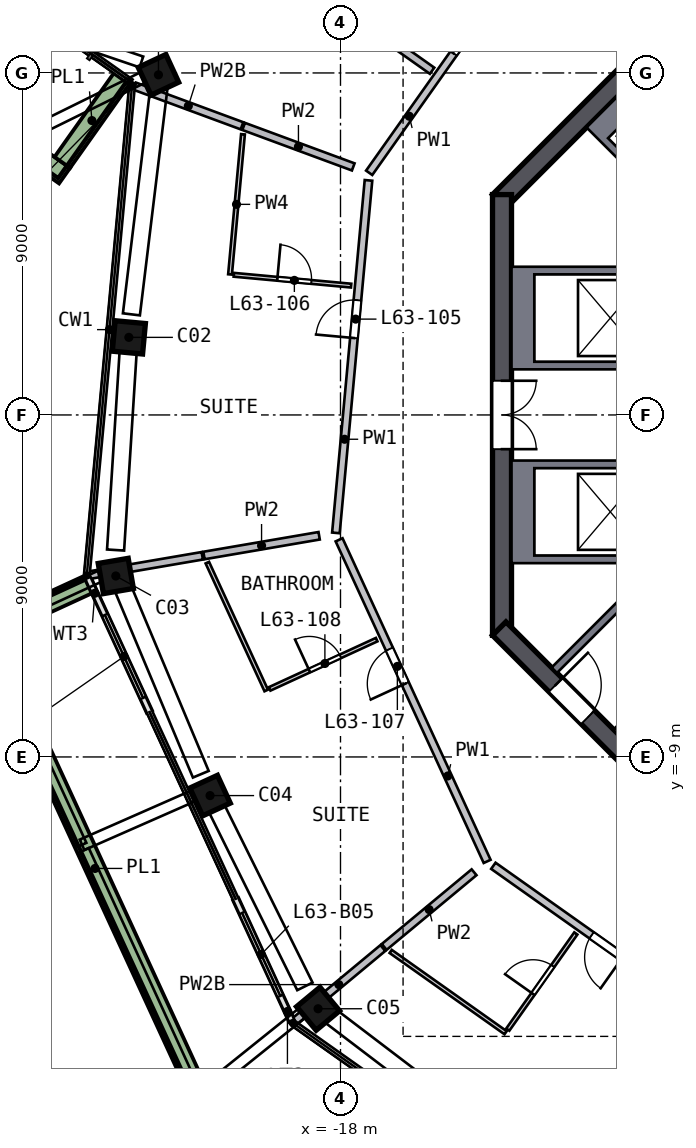
"""IFC4 building model, lengths in metres.
Left out: names, types, materials, properties, quantities, classifications, styles, units other than length and angle.
Written with IfcOpenShell. Run it as: python <this file> out.ifc"""

import sys

from ifc_helpers import new_model, si_unit, direction, frame, frame_2d, origin, origin_2d, place, context, subcontext, project, spatial, polyline, rectangle, outline, extrude, element, fill, save


model = new_model("IFC4")
c1 = context("Model", 3, precision=1e-05, world=origin(), true_north=direction((0.0, 1.0)))
c2 = subcontext(c1, "Body", "Model", "MODEL_VIEW")
j1 = project(units=[si_unit("LENGTHUNIT", "METRE"), si_unit("PLANEANGLEUNIT", "RADIAN")], contexts=[c1])
p1 = place(None, origin())
s1 = spatial("IfcSite", under=j1, at=p1, CompositionType="ELEMENT")
p2 = place(p1, origin())
s2 = spatial("IfcBuilding", under=s1, at=p2, CompositionType="ELEMENT")
p3 = place(p2, frame((0.0, 0.0, 256.0)))
s3 = spatial("IfcBuildingStorey", under=s2, at=p3, CompositionType="ELEMENT", Elevation=256.0)
p4 = place(p3, frame((-22.739, 9.081, 0.0), z_axis=(-0.042339736, -0.108471819, 0.993197468), x_axis=(-0.42248702, 0.902779355, 0.080586321)))
e1 = element("IfcColumn", 1, at=p4, inside=s3, PredefinedType="COLUMN", context=c2, shape_type="SweptSolid", body=[
    extrude(rectangle(XDim=0.8, YDim=0.8, at=origin_2d()), origin(), (0.0, 0.0, 1.0), 3.212),
])
p5 = place(p3, frame((-23.558, 2.177, 0.0), z_axis=(-0.009430042, -0.112095822, 0.993652656), x_axis=(-0.091695583, -0.98941317, -0.112487775)))
e2 = element("IfcColumn", 2, at=p5, inside=s3, PredefinedType="COLUMN", context=c2, shape_type="SweptSolid", body=[
    extrude(rectangle(XDim=0.8, YDim=0.8, at=origin_2d()), origin(), (0.0, 0.0, 1.0), 3.21),
])
p6 = place(p3, frame((-23.937, -4.1, 0.0), z_axis=(0.020450052, -0.113653633, 0.993309945), x_axis=(-0.167598199, 0.97906917, 0.115474692)))
e3 = element("IfcColumn", 3, at=p6, inside=s3, PredefinedType="COLUMN", context=c2, shape_type="SweptSolid", body=[
    extrude(rectangle(XDim=0.8, YDim=0.8, at=origin_2d()), origin(), (0.0, 0.0, 1.0), 3.211),
])
p7 = place(p3, frame((-21.49, -9.894, 0.0), z_axis=(0.047910452, -0.101828723, 0.993647573), x_axis=(0.415383165, -0.902658976, -0.112532662)))
e4 = element("IfcColumn", 4, at=p7, inside=s3, PredefinedType="COLUMN", context=c2, shape_type="SweptSolid", body=[
    extrude(rectangle(XDim=0.8, YDim=0.8, at=origin_2d()), origin(), (0.0, 0.0, 1.0), 3.21),
])
p8 = place(p3, frame((-18.68, -15.52, 0.0), z_axis=(0.074577946, -0.08818595, 0.993308295), x_axis=(-0.634952421, 0.763870238, 0.115488887)))
e5 = element("IfcColumn", 5, at=p8, inside=s3, PredefinedType="COLUMN", context=c2, shape_type="SweptSolid", body=[
    extrude(rectangle(XDim=0.8, YDim=0.8, at=origin_2d()), origin(), (0.0, 0.0, 1.0), 3.211),
])
p9 = place(p3, frame((-5.622, 13.823, 0.0), z_axis=(0.0, 0.0, 1.0), x_axis=(-0.707106781, -0.707106781, 0.0)))
e6 = element("IfcWall", 6, at=p9, inside=s3, PredefinedType="SHEAR", context=c2, shape_type="SweptSolid", body=[
    extrude(rectangle(XDim=11.598, YDim=0.5, at=frame_2d((5.799, 0.0))), origin(), (0.0, 0.0, 1.0), 3.5),
])
p10 = place(p3, frame((-13.75, 5.799, 0.0), z_axis=(0.0, 0.0, 1.0), x_axis=(0.0, -1.0, 0.0)))
e7 = element("IfcWall", 7, at=p10, inside=s3, PredefinedType="SHEAR", context=c2, shape_type="SweptSolid", body=[
    extrude(rectangle(XDim=11.598, YDim=0.5, at=frame_2d((5.799, 0.0))), origin(), (0.0, 0.0, 1.0), 3.5),
])
p11 = place(p10, frame((4.899, 0.0, 0.0)))
e8 = element("IfcOpeningElement", 8, at=p11, cuts=e7, PredefinedType="OPENING", context=c2, shape_type="SweptSolid", body=[
    extrude(rectangle(XDim=1.8, YDim=2.1, at=frame_2d((0.9, 1.05))), frame((0.0, 0.26, 0.0), z_axis=(0.0, -1.0, 0.0), x_axis=(1.0, 0.0, 0.0)), (0.0, 0.0, 1.0), 0.52),
])
p12 = place(p3, frame((-13.823, -5.622, 0.0), z_axis=(0.0, 0.0, 1.0), x_axis=(0.707106781, -0.707106781, 0.0)))
e9 = element("IfcWall", 9, at=p12, inside=s3, PredefinedType="SHEAR", context=c2, shape_type="SweptSolid", body=[
    extrude(rectangle(XDim=11.598, YDim=0.5, at=frame_2d((5.799, 0.0))), origin(), (0.0, 0.0, 1.0), 3.5),
])
p13 = place(p12, frame((2.099, 0.0, 0.0)))
e10 = element("IfcOpeningElement", 10, at=p13, cuts=e9, PredefinedType="OPENING", context=c2, shape_type="SweptSolid", body=[
    extrude(rectangle(XDim=1.2, YDim=2.1, at=frame_2d((0.6, 1.05))), frame((0.0, 0.26, 0.0), z_axis=(0.0, -1.0, 0.0), x_axis=(1.0, 0.0, 0.0)), (0.0, 0.0, 1.0), 0.52),
])
p14 = place(p3, frame((-24.644, -4.3, 0.0), z_axis=(0.0, 0.0, 1.0), x_axis=(0.418188304, -0.908360359, 0.0)))
e11 = element("IfcWall", 11, at=p14, inside=s3, PredefinedType="SOLIDWALL", context=c2, shape_type="SweptSolid", body=[
    extrude(rectangle(XDim=3.863, YDim=0.15, at=frame_2d((1.932, 0.0))), origin(), (0.0, 0.0, 1.0), 2.525),
])
p15 = place(p14, frame((1.063, 0.0, 0.0)))
e12 = element("IfcOpeningElement", 12, at=p15, cuts=e11, PredefinedType="OPENING", context=c2, shape_type="SweptSolid", body=[
    extrude(rectangle(XDim=2.4, YDim=2.4, at=frame_2d((1.2, 1.2))), frame((0.0, 0.085, 0.0), z_axis=(0.0, -1.0, 0.0), x_axis=(1.0, 0.0, 0.0)), (0.0, 0.0, 1.0), 0.17),
])
p16 = place(p3, frame((-20.756, -12.743, 0.0), z_axis=(0.0, 0.0, 1.0), x_axis=(0.418165506, -0.908370855, 0.0)))
e13 = element("IfcWall", 13, at=p16, inside=s3, PredefinedType="SOLIDWALL", context=c2, shape_type="SweptSolid", body=[
    extrude(rectangle(XDim=3.504, YDim=0.15, at=frame_2d((1.752, 0.0))), origin(), (0.0, 0.0, 1.0), 2.525),
])
p17 = place(p16, frame((0.4, 0.0, 0.0)))
e14 = element("IfcOpeningElement", 14, at=p17, cuts=e13, PredefinedType="OPENING", context=c2, shape_type="SweptSolid", body=[
    extrude(rectangle(XDim=2.4, YDim=2.4, at=frame_2d((1.2, 1.2))), frame((0.0, 0.085, 0.0), z_axis=(0.0, -1.0, 0.0), x_axis=(1.0, 0.0, 0.0)), (0.0, 0.0, 1.0), 0.17),
])
p18 = place(p3, frame((-29.748, 9.471, 0.0), z_axis=(0.0, 0.0, 1.0), x_axis=(0.816360468, -0.577542714, 0.0)))
e15 = element("IfcWall", 15, at=p18, inside=s3, PredefinedType="SOLIDWALL", context=c2, shape_type="SweptSolid", body=[
    extrude(rectangle(XDim=5.496, YDim=0.5, at=frame_2d((2.748, 0.0))), origin(), (0.0, 0.0, 1.0), 0.7),
])
p19 = place(p3, frame((-25.321, 6.645, 0.0), z_axis=(0.0, 0.0, 1.0), x_axis=(0.577552948, 0.816353227, 0.0)))
e16 = element("IfcWall", 16, at=p19, inside=s3, PredefinedType="SOLIDWALL", context=c2, shape_type="SweptSolid", body=[
    extrude(rectangle(XDim=2.699, YDim=0.5, at=frame_2d((1.35, 0.0))), origin(), (0.0, 0.0, 1.0), 0.7),
])
p20 = place(p3, frame((-24.65, -4.468, 0.0), z_axis=(0.0, 0.0, 1.0), x_axis=(-0.908343202, -0.418225571, 0.0)))
e17 = element("IfcWall", 17, at=p20, inside=s3, PredefinedType="SOLIDWALL", context=c2, shape_type="SweptSolid", body=[
    extrude(rectangle(XDim=3.199, YDim=0.5, at=frame_2d((1.6, 0.0))), origin(), (0.0, 0.0, 1.0), 0.7),
])
p21 = place(p3, frame((-27.224, -5.928, 0.0), z_axis=(0.0, 0.0, 1.0), x_axis=(0.418179878, -0.908364238, 0.0)))
e18 = element("IfcWall", 18, at=p21, inside=s3, PredefinedType="SOLIDWALL", context=c2, shape_type="SweptSolid", body=[
    extrude(rectangle(XDim=13.223, YDim=0.5, at=frame_2d((6.612, 0.0))), origin(), (0.0, 0.0, 1.0), 0.7),
])
p22 = place(p3, origin())
e19 = element("IfcWall", 19, at=p22, inside=s3, PredefinedType="SOLIDWALL", context=c2, shape_type="SweptSolid", body=[
    extrude(outline(polyline([(-13.5, 3.9), (-9.9, 3.9), (-9.9, 3.7), (-12.9, 3.7), (-12.9, 1.4), (-9.9, 1.4), (-9.9, 1.2), (-13.5, 1.2), (-13.5, 3.9)])), origin(), (0.0, 0.0, 1.0), 3.19),
])
p23 = place(p3, origin())
e20 = element("IfcWall", 20, at=p23, inside=s3, PredefinedType="SOLIDWALL", context=c2, shape_type="SweptSolid", body=[
    extrude(outline(polyline([(-13.5, -3.9), (-13.5, -1.2), (-9.9, -1.2), (-9.9, -1.4), (-12.9, -1.4), (-12.9, -3.7), (-9.9, -3.7), (-9.9, -3.9), (-13.5, -3.9)])), origin(), (0.0, 0.0, 1.0), 3.19),
])
p24 = place(p3, origin())
e21 = element("IfcWall", 21, at=p24, inside=s3, PredefinedType="SOLIDWALL", context=c2, shape_type="SweptSolid", body=[
    extrude(outline(polyline([(-11.526, 7.566), (-9.617, 9.475), (-9.192, 9.051), (-10.96, 7.283), (-8.874, 5.197), (-9.016, 5.056), (-11.526, 7.566)])), origin(), (0.0, 0.0, 1.0), 3.19),
])
p25 = place(p3, frame((-9.334, -3.677, 0.0), z_axis=(0.0, 0.0, 1.0), x_axis=(-0.707135168, -0.707078393, 0.0)))
e22 = element("IfcWall", 22, at=p25, inside=s3, PredefinedType="SOLIDWALL", context=c2, shape_type="SweptSolid", body=[
    extrude(rectangle(XDim=4.3, YDim=0.2, at=frame_2d((2.15, 0.0))), origin(), (0.0, 0.0, 1.0), 3.19),
])
p26 = place(p3, frame((-18.121, -3.104, 0.0), z_axis=(0.0, 0.0, 1.0), x_axis=(0.092031251, 0.995756119, 0.0)))
e23 = element("IfcWall", 23, at=p26, inside=s3, PredefinedType="SOLIDWALL", context=c2, shape_type="SweptSolid", body=[
    extrude(rectangle(XDim=9.317, YDim=0.2, at=frame_2d((4.658, 0.0))), origin(), (0.0, 0.0, 1.0), 3.19),
])
p27 = place(p26, frame((5.15, 0.0, 0.0)))
e24 = element("IfcOpeningElement", 24, at=p27, cuts=e23, PredefinedType="OPENING", context=c2, shape_type="SweptSolid", body=[
    extrude(rectangle(XDim=1.0, YDim=2.1, at=frame_2d((0.5, 1.05))), frame((0.0, 0.11, 0.0), z_axis=(0.0, -1.0, 0.0), x_axis=(1.0, 0.0, 0.0)), (0.0, 0.0, 1.0), 0.22),
])
p28 = place(p3, frame((-14.141, -11.749, 0.0), z_axis=(0.0, 0.0, 1.0), x_axis=(-0.418177241, 0.908365452, 0.0)))
e25 = element("IfcWall", 25, at=p28, inside=s3, PredefinedType="SOLIDWALL", context=c2, shape_type="SweptSolid", body=[
    extrude(rectangle(XDim=9.317, YDim=0.2, at=frame_2d((4.658, 0.0))), origin(), (0.0, 0.0, 1.0), 3.19),
])
p29 = place(p28, frame((5.15, 0.0, 0.0)))
e26 = element("IfcOpeningElement", 26, at=p29, cuts=e25, PredefinedType="OPENING", context=c2, shape_type="SweptSolid", body=[
    extrude(rectangle(XDim=1.0, YDim=2.1, at=frame_2d((0.5, 1.05))), frame((0.0, 0.11, 0.0), z_axis=(0.0, -1.0, 0.0), x_axis=(1.0, 0.0, 0.0)), (0.0, 0.0, 1.0), 0.22),
])
p30 = place(p3, frame((-17.245, 6.372, 0.0), z_axis=(0.0, 0.0, 1.0), x_axis=(0.577581016, 0.81633337, 0.0)))
e27 = element("IfcWall", 27, at=p30, inside=s3, PredefinedType="SOLIDWALL", context=c2, shape_type="SweptSolid", body=[
    extrude(rectangle(XDim=9.317, YDim=0.2, at=frame_2d((4.658, 0.0))), origin(), (0.0, 0.0, 1.0), 3.19),
])
p31 = place(p30, frame((3.848, 0.0, 0.0)))
e28 = element("IfcOpeningElement", 28, at=p31, cuts=e27, PredefinedType="OPENING", context=c2, shape_type="SweptSolid", body=[
    extrude(rectangle(XDim=1.8, YDim=2.1, at=frame_2d((0.9, 1.05))), frame((0.0, 0.11, 0.0), z_axis=(0.0, -1.0, 0.0), x_axis=(1.0, 0.0, 0.0)), (0.0, 0.0, 1.0), 0.22),
])
p32 = place(p3, frame((-6.372, -17.245, 0.0), z_axis=(0.0, 0.0, 1.0), x_axis=(-0.81633337, 0.577581016, 0.0)))
e29 = element("IfcWall", 29, at=p32, inside=s3, PredefinedType="SOLIDWALL", context=c2, shape_type="SweptSolid", body=[
    extrude(rectangle(XDim=9.317, YDim=0.2, at=frame_2d((4.658, 0.0))), origin(), (0.0, 0.0, 1.0), 3.19),
])
p33 = place(p32, frame((5.15, 0.0, 0.0)))
e30 = element("IfcOpeningElement", 30, at=p33, cuts=e29, PredefinedType="OPENING", context=c2, shape_type="SweptSolid", body=[
    extrude(rectangle(XDim=1.0, YDim=2.1, at=frame_2d((0.5, 1.05))), frame((0.0, 0.11, 0.0), z_axis=(0.0, -1.0, 0.0), x_axis=(1.0, 0.0, 0.0)), (0.0, 0.0, 1.0), 0.22),
])
p34 = place(p3, frame((-21.637, -3.706, 0.0), z_axis=(0.0, 0.0, 1.0), x_axis=(-0.985638837, -0.168867058, 0.0)))
e31 = element("IfcWall", 31, at=p34, inside=s3, PredefinedType="SOLIDWALL", context=c2, shape_type="SweptSolid", body=[
    extrude(rectangle(XDim=3.011, YDim=0.2, at=frame_2d((1.506, 0.0))), origin(), (0.0, 0.0, 1.0), 3.19),
])
p35 = place(p3, frame((-20.592, 7.609, 0.0), z_axis=(0.0, 0.0, 1.0), x_axis=(-0.93799106, 0.346659445, 0.0)))
e32 = element("IfcWall", 32, at=p35, inside=s3, PredefinedType="SOLIDWALL", context=c2, shape_type="SweptSolid", body=[
    extrude(rectangle(XDim=3.011, YDim=0.2, at=frame_2d((1.506, 0.0))), origin(), (0.0, 0.0, 1.0), 2.69),
])
p36 = place(p3, frame((-18.562, -3.179, 0.0), z_axis=(0.0, 0.0, 1.0), x_axis=(-0.985647935, -0.168813946, 0.0)))
e33 = element("IfcWall", 33, at=p36, inside=s3, PredefinedType="SOLIDWALL", context=c2, shape_type="SweptSolid", body=[
    extrude(rectangle(XDim=3.075, YDim=0.2, at=frame_2d((1.537, 0.0))), origin(), (0.0, 0.0, 1.0), 3.19),
])
p37 = place(p3, frame((-15.59, 9.058, 0.0), z_axis=(0.0, 0.0, 1.0), x_axis=(-0.816355957, 0.57754909, 0.0)))
e34 = element("IfcWall", 34, at=p37, inside=s3, PredefinedType="SOLIDWALL", context=c2, shape_type="SweptSolid", body=[
    extrude(rectangle(XDim=10.302, YDim=0.2, at=frame_2d((5.151, 0.0))), origin(), (0.0, 0.0, 1.0), 3.19),
])
p38 = place(p37, frame((2.95, 0.0, 0.0)))
e35 = element("IfcOpeningElement", 35, at=p38, cuts=e34, PredefinedType="OPENING", context=c2, shape_type="SweptSolid", body=[
    extrude(rectangle(XDim=1.0, YDim=2.1, at=frame_2d((0.5, 1.05))), frame((0.0, 0.11, 0.0), z_axis=(0.0, -1.0, 0.0), x_axis=(1.0, 0.0, 0.0)), (0.0, 0.0, 1.0), 0.22),
])
p39 = place(p3, frame((-17.665, 6.527, 0.0), z_axis=(0.0, 0.0, 1.0), x_axis=(-0.938011897, 0.346603059, 0.0)))
e36 = element("IfcWall", 36, at=p39, inside=s3, PredefinedType="SOLIDWALL", context=c2, shape_type="SweptSolid", body=[
    extrude(rectangle(XDim=3.075, YDim=0.2, at=frame_2d((1.537, 0.0))), origin(), (0.0, 0.0, 1.0), 3.19),
])
p40 = place(p3, frame((-16.885, -14.029, 0.0), z_axis=(0.0, 0.0, 1.0), x_axis=(-0.769170754, -0.63904331, 0.0)))
e37 = element("IfcWall", 37, at=p40, inside=s3, PredefinedType="SOLIDWALL", context=c2, shape_type="SweptSolid", body=[
    extrude(rectangle(XDim=3.011, YDim=0.2, at=frame_2d((1.506, 0.0))), origin(), (0.0, 0.0, 1.0), 2.69),
])
p41 = place(p3, frame((-14.485, -12.034, 0.0), z_axis=(0.0, 0.0, 1.0), x_axis=(-0.769177163, -0.639035595, 0.0)))
e38 = element("IfcWall", 38, at=p41, inside=s3, PredefinedType="SOLIDWALL", context=c2, shape_type="SweptSolid", body=[
    extrude(rectangle(XDim=3.075, YDim=0.2, at=frame_2d((1.537, 0.0))), origin(), (0.0, 0.0, 1.0), 3.19),
])
p42 = place(p3, frame((-20.907, 3.698, 0.0), z_axis=(0.0, 0.0, 1.0), x_axis=(0.092015462, 0.995757578, 0.0)))
e39 = element("IfcWall", 39, at=p42, inside=s3, PredefinedType="PARTITIONING", context=c2, shape_type="SweptSolid", body=[
    extrude(rectangle(XDim=3.704, YDim=0.1, at=frame_2d((1.852, 0.0))), origin(), (0.0, 0.0, 1.0), 3.19),
])
p43 = place(p3, frame((-19.955, -7.251, 0.0), z_axis=(0.0, 0.0, 1.0), x_axis=(-0.418192811, 0.908358285, 0.0)))
e40 = element("IfcWall", 40, at=p43, inside=s3, PredefinedType="PARTITIONING", context=c2, shape_type="SweptSolid", body=[
    extrude(rectangle(XDim=3.704, YDim=0.1, at=frame_2d((1.852, 0.0))), origin(), (0.0, 0.0, 1.0), 3.19),
])
p44 = place(p3, frame((-20.807, 3.689, 0.0), z_axis=(0.0, 0.0, 1.0), x_axis=(0.99575325, -0.092062286, 0.0)))
e41 = element("IfcWall", 41, at=p44, inside=s3, PredefinedType="PARTITIONING", context=c2, shape_type="SweptSolid", body=[
    extrude(rectangle(XDim=3.1, YDim=0.1, at=frame_2d((1.55, 0.0))), origin(), (0.0, 0.0, 1.0), 3.19),
])
p45 = place(p44, frame((1.15, 0.0, 0.0)))
e42 = element("IfcOpeningElement", 42, at=p45, cuts=e41, PredefinedType="OPENING", context=c2, shape_type="SweptSolid", body=[
    extrude(rectangle(XDim=0.9, YDim=2.1, at=frame_2d((0.45, 1.05))), frame((0.0, 0.06, 0.0), z_axis=(0.0, -1.0, 0.0), x_axis=(1.0, 0.0, 0.0)), (0.0, 0.0, 1.0), 0.12),
])
p46 = place(p3, frame((-19.864, -7.209, 0.0), z_axis=(0.0, 0.0, 1.0), x_axis=(0.908360043, 0.418188991, 0.0)))
e43 = element("IfcWall", 43, at=p46, inside=s3, PredefinedType="PARTITIONING", context=c2, shape_type="SweptSolid", body=[
    extrude(rectangle(XDim=3.1, YDim=0.1, at=frame_2d((1.55, 0.0))), origin(), (0.0, 0.0, 1.0), 3.19),
])
p47 = place(p46, frame((1.15, 0.0, 0.0)))
e44 = element("IfcOpeningElement", 44, at=p47, cuts=e43, PredefinedType="OPENING", context=c2, shape_type="SweptSolid", body=[
    extrude(rectangle(XDim=0.9, YDim=2.1, at=frame_2d((0.45, 1.05))), frame((0.0, 0.06, 0.0), z_axis=(0.0, -1.0, 0.0), x_axis=(1.0, 0.0, 0.0)), (0.0, 0.0, 1.0), 0.12),
])
p48 = place(p3, frame((-13.656, -16.257, 0.0), z_axis=(0.0, 0.0, 1.0), x_axis=(-0.816326196, 0.577591155, 0.0)))
e45 = element("IfcWall", 45, at=p48, inside=s3, PredefinedType="PARTITIONING", context=c2, shape_type="SweptSolid", body=[
    extrude(rectangle(XDim=3.704, YDim=0.1, at=frame_2d((1.852, 0.0))), origin(), (0.0, 0.0, 1.0), 3.19),
])
p49 = place(p3, frame((-13.598, -16.175, 0.0), z_axis=(0.0, 0.0, 1.0), x_axis=(0.577567137, 0.816343189, 0.0)))
e46 = element("IfcWall", 46, at=p49, inside=s3, PredefinedType="PARTITIONING", context=c2, shape_type="SweptSolid", body=[
    extrude(rectangle(XDim=3.1, YDim=0.1, at=frame_2d((1.55, 0.0))), origin(), (0.0, 0.0, 1.0), 3.19),
])
p50 = place(p49, frame((1.15, 0.0, 0.0)))
e47 = element("IfcOpeningElement", 47, at=p50, cuts=e46, PredefinedType="OPENING", context=c2, shape_type="SweptSolid", body=[
    extrude(rectangle(XDim=0.9, YDim=2.1, at=frame_2d((0.45, 1.05))), frame((0.0, 0.06, 0.0), z_axis=(0.0, -1.0, 0.0), x_axis=(1.0, 0.0, 0.0)), (0.0, 0.0, 1.0), 0.12),
])
p51 = place(p15, origin())
e48 = element("IfcDoor", 48, at=p51, inside=s3, OperationType="SLIDING_TO_LEFT", PredefinedType="DOOR", context=c2, shape_type="SweptSolid", body=[
    extrude(rectangle(XDim=2.4, YDim=2.4, at=frame_2d((1.2, 1.2))), frame((0.0, 0.025, 0.0), z_axis=(0.0, -1.0, 0.0), x_axis=(1.0, 0.0, 0.0)), (0.0, 0.0, 1.0), 0.05),
])
fill(e12, e48)
p52 = place(p17, origin())
e49 = element("IfcDoor", 49, at=p52, inside=s3, OperationType="SLIDING_TO_RIGHT", PredefinedType="DOOR", context=c2, shape_type="SweptSolid", body=[
    extrude(rectangle(XDim=2.4, YDim=2.4, at=frame_2d((1.2, 1.2))), frame((0.0, 0.025, 0.0), z_axis=(0.0, -1.0, 0.0), x_axis=(1.0, 0.0, 0.0)), (0.0, 0.0, 1.0), 0.05),
])
fill(e14, e49)
p53 = place(p11, origin())
e50 = element("IfcDoor", 50, at=p53, inside=s3, OperationType="DOUBLE_DOOR_SINGLE_SWING", PredefinedType="DOOR", context=c2, shape_type="SweptSolid", body=[
    extrude(rectangle(XDim=1.8, YDim=2.1, at=frame_2d((0.9, 1.05))), frame((0.0, 0.025, 0.0), z_axis=(0.0, -1.0, 0.0), x_axis=(1.0, 0.0, 0.0)), (0.0, 0.0, 1.0), 0.05),
])
fill(e8, e50)
p54 = place(p13, origin())
e51 = element("IfcDoor", 51, at=p54, inside=s3, OperationType="SINGLE_SWING_LEFT", PredefinedType="DOOR", context=c2, shape_type="SweptSolid", body=[
    extrude(rectangle(XDim=1.2, YDim=2.1, at=frame_2d((0.6, 1.05))), frame((0.0, 0.025, 0.0), z_axis=(0.0, -1.0, 0.0), x_axis=(1.0, 0.0, 0.0)), (0.0, 0.0, 1.0), 0.05),
])
fill(e10, e51)
p55 = place(p31, origin())
e52 = element("IfcDoor", 52, at=p55, inside=s3, OperationType="DOUBLE_DOOR_SINGLE_SWING", PredefinedType="DOOR", context=c2, shape_type="SweptSolid", body=[
    extrude(rectangle(XDim=1.8, YDim=2.1, at=frame_2d((0.9, 1.05))), frame((0.0, 0.025, 0.0), z_axis=(0.0, -1.0, 0.0), x_axis=(1.0, 0.0, 0.0)), (0.0, 0.0, 1.0), 0.05),
])
fill(e28, e52)
p56 = place(p27, origin())
e53 = element("IfcDoor", 53, at=p56, inside=s3, OperationType="SINGLE_SWING_LEFT", PredefinedType="DOOR", context=c2, shape_type="SweptSolid", body=[
    extrude(rectangle(XDim=1.0, YDim=2.1, at=frame_2d((0.5, 1.05))), frame((0.0, 0.025, 0.0), z_axis=(0.0, -1.0, 0.0), x_axis=(1.0, 0.0, 0.0)), (0.0, 0.0, 1.0), 0.05),
])
fill(e24, e53)
p57 = place(p45, origin())
e54 = element("IfcDoor", 54, at=p57, inside=s3, OperationType="SINGLE_SWING_LEFT", PredefinedType="DOOR", context=c2, shape_type="SweptSolid", body=[
    extrude(rectangle(XDim=0.9, YDim=2.1, at=frame_2d((0.45, 1.05))), frame((0.0, 0.025, 0.0), z_axis=(0.0, -1.0, 0.0), x_axis=(1.0, 0.0, 0.0)), (0.0, 0.0, 1.0), 0.05),
])
fill(e42, e54)
p58 = place(p29, origin())
e55 = element("IfcDoor", 55, at=p58, inside=s3, OperationType="SINGLE_SWING_LEFT", PredefinedType="DOOR", context=c2, shape_type="SweptSolid", body=[
    extrude(rectangle(XDim=1.0, YDim=2.1, at=frame_2d((0.5, 1.05))), frame((0.0, 0.025, 0.0), z_axis=(0.0, -1.0, 0.0), x_axis=(1.0, 0.0, 0.0)), (0.0, 0.0, 1.0), 0.05),
])
fill(e26, e55)
p59 = place(p47, origin())
e56 = element("IfcDoor", 56, at=p59, inside=s3, OperationType="SINGLE_SWING_LEFT", PredefinedType="DOOR", context=c2, shape_type="SweptSolid", body=[
    extrude(rectangle(XDim=0.9, YDim=2.1, at=frame_2d((0.45, 1.05))), frame((0.0, 0.025, 0.0), z_axis=(0.0, -1.0, 0.0), x_axis=(1.0, 0.0, 0.0)), (0.0, 0.0, 1.0), 0.05),
])
fill(e44, e56)
p60 = place(p33, origin())
e57 = element("IfcDoor", 57, at=p60, inside=s3, OperationType="SINGLE_SWING_LEFT", PredefinedType="DOOR", context=c2, shape_type="SweptSolid", body=[
    extrude(rectangle(XDim=1.0, YDim=2.1, at=frame_2d((0.5, 1.05))), frame((0.0, 0.025, 0.0), z_axis=(0.0, -1.0, 0.0), x_axis=(1.0, 0.0, 0.0)), (0.0, 0.0, 1.0), 0.05),
])
fill(e30, e57)
p61 = place(p50, origin())
e58 = element("IfcDoor", 58, at=p61, inside=s3, OperationType="SINGLE_SWING_LEFT", PredefinedType="DOOR", context=c2, shape_type="SweptSolid", body=[
    extrude(rectangle(XDim=0.9, YDim=2.1, at=frame_2d((0.45, 1.05))), frame((0.0, 0.025, 0.0), z_axis=(0.0, -1.0, 0.0), x_axis=(1.0, 0.0, 0.0)), (0.0, 0.0, 1.0), 0.05),
])
fill(e47, e58)
save(model, sys.argv[1])
